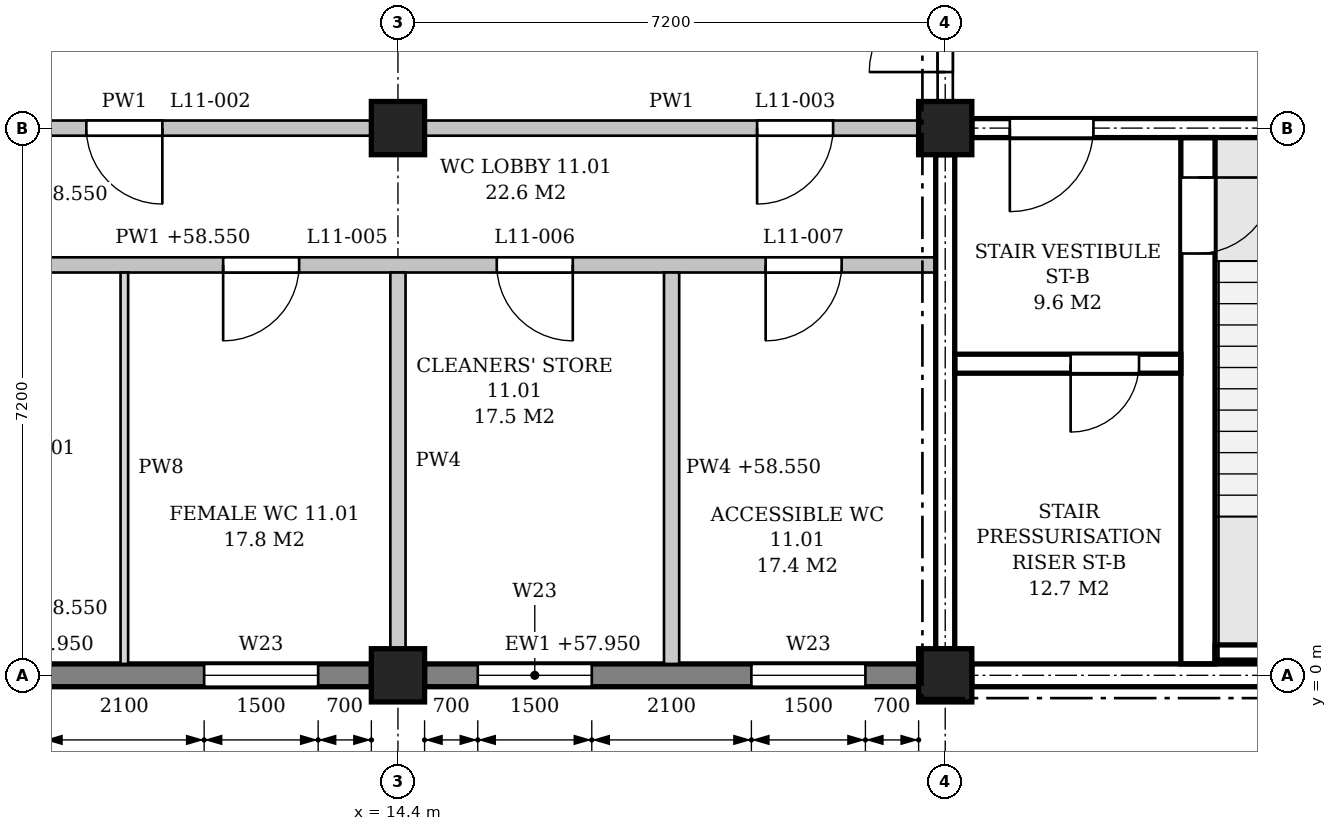
"""IFC4 building model, lengths in metres.
Left out: names, types, materials, properties, quantities, classifications, styles, units other than length and angle.
Written with IfcOpenShell. Run it as: python <this file> out.ifc"""

import sys

from ifc_helpers import new_model, si_unit, direction, frame, frame_2d, origin, origin_2d, place, context, subcontext, project, spatial, polyline, rectangle, outline, extrude, element, fill, save


model = new_model("IFC4")
c1 = context("Model", 3, precision=1e-05, world=origin(), true_north=direction((0.0, 1.0)))
c2 = subcontext(c1, "Body", "Model", "MODEL_VIEW")
j1 = project(units=[si_unit("LENGTHUNIT", "METRE"), si_unit("PLANEANGLEUNIT", "RADIAN")], contexts=[c1])
p1 = place(None, origin())
s1 = spatial("IfcSite", under=j1, at=p1, CompositionType="ELEMENT")
p2 = place(p1, origin())
s2 = spatial("IfcBuilding", under=s1, at=p2, CompositionType="ELEMENT")
p3 = place(p2, frame((0.0, 0.0, 54.3)))
s3 = spatial("IfcBuildingStorey", under=s2, at=p3, CompositionType="ELEMENT", Elevation=54.3)
for number, where, z_axis, x_axis in (
    (1, (14.4, 0.0, 0.0), (0.0, 0.0, 1.0), (1.0, 0.0, 0.0)),
    (2, (14.4, 7.2, 0.0), (0.0, 0.0, 1.0), (1.0, 0.0, 0.0)),
    (3, (21.6, 0.0, 0.0), (0.0, 0.0, 1.0), (1.0, 0.0, 0.0)),
    (4, (21.6, 7.2, 0.0), (0.0, 0.0, 1.0), (1.0, 0.0, 0.0)),
):
    element("IfcColumn", number, at=place(p3, frame(where, z_axis=z_axis, x_axis=x_axis)), inside=s3, PredefinedType="COLUMN", context=c2, shape_type="SweptSolid", body=[
        extrude(rectangle(XDim=0.7, YDim=0.7, at=origin_2d()), origin(), (0.0, 0.0, 1.0), 4.5),
    ])
p4 = place(p3, frame((7.55, 0.0, 0.0), z_axis=(0.0, 0.0, 1.0), x_axis=(1.0, 0.0, 0.0)))
e5 = element("IfcWall", 5, at=p4, inside=s3, PredefinedType="STANDARD", context=c2, shape_type="SweptSolid", body=[
    extrude(rectangle(XDim=6.5, YDim=0.3, at=frame_2d((3.25, 0.0))), origin(), (0.0, 0.0, 1.0), 3.65),
])
p5 = place(p4, frame((0.7, 0.0, 0.9)))
e6 = element("IfcOpeningElement", 6, at=p5, cuts=e5, PredefinedType="OPENING", context=c2, shape_type="SweptSolid", body=[
    extrude(outline(polyline([(0.0, 0.0), (1.5, 0.0), (1.5, 1.95), (0.75, 2.7), (0.0, 1.95), (0.0, 0.0)])), frame((0.0, 0.16, 0.0), z_axis=(0.0, -1.0, 0.0), x_axis=(1.0, 0.0, 0.0)), (0.0, 0.0, 1.0), 0.32),
])
p6 = place(p4, frame((4.3, 0.0, 0.9)))
e7 = element("IfcOpeningElement", 7, at=p6, cuts=e5, PredefinedType="OPENING", context=c2, shape_type="SweptSolid", body=[
    extrude(outline(polyline([(0.0, 0.0), (1.5, 0.0), (1.5, 1.95), (0.75, 2.7), (0.0, 1.95), (0.0, 0.0)])), frame((0.0, 0.16, 0.0), z_axis=(0.0, -1.0, 0.0), x_axis=(1.0, 0.0, 0.0)), (0.0, 0.0, 1.0), 0.32),
])
p7 = place(p3, frame((14.75, 0.0, 0.0), z_axis=(0.0, 0.0, 1.0), x_axis=(1.0, 0.0, 0.0)))
e8 = element("IfcWall", 8, at=p7, inside=s3, PredefinedType="STANDARD", context=c2, shape_type="SweptSolid", body=[
    extrude(rectangle(XDim=6.5, YDim=0.3, at=frame_2d((3.25, 0.0))), origin(), (0.0, 0.0, 1.0), 3.65),
])
p8 = place(p7, frame((0.7, 0.0, 0.9)))
e9 = element("IfcOpeningElement", 9, at=p8, cuts=e8, PredefinedType="OPENING", context=c2, shape_type="SweptSolid", body=[
    extrude(outline(polyline([(0.0, 0.0), (1.5, 0.0), (1.5, 1.95), (0.75, 2.7), (0.0, 1.95), (0.0, 0.0)])), frame((0.0, 0.16, 0.0), z_axis=(0.0, -1.0, 0.0), x_axis=(1.0, 0.0, 0.0)), (0.0, 0.0, 1.0), 0.32),
])
p9 = place(p7, frame((4.3, 0.0, 0.9)))
e10 = element("IfcOpeningElement", 10, at=p9, cuts=e8, PredefinedType="OPENING", context=c2, shape_type="SweptSolid", body=[
    extrude(outline(polyline([(0.0, 0.0), (1.5, 0.0), (1.5, 1.95), (0.75, 2.7), (0.0, 1.95), (0.0, 0.0)])), frame((0.0, 0.16, 0.0), z_axis=(0.0, -1.0, 0.0), x_axis=(1.0, 0.0, 0.0)), (0.0, 0.0, 1.0), 0.32),
])
p10 = place(p3, frame((21.95, 0.0, 0.0), z_axis=(0.0, 0.0, 1.0), x_axis=(1.0, 0.0, 0.0)))
e11 = element("IfcWall", 11, at=p10, inside=s3, PredefinedType="STANDARD", context=c2, shape_type="SweptSolid", body=[
    extrude(rectangle(XDim=6.5, YDim=0.3, at=frame_2d((3.25, 0.0))), origin(), (0.0, 0.0, 1.0), 3.65),
])
p11 = place(p10, frame((4.6, 0.0, 0.9)))
e12 = element("IfcOpeningElement", 12, at=p11, cuts=e11, PredefinedType="OPENING", context=c2, shape_type="SweptSolid", body=[
    extrude(outline(polyline([(0.0, 0.0), (0.9, 0.0), (0.9, 2.25), (0.45, 2.7), (0.0, 2.25), (0.0, 0.0)])), frame((0.0, 0.16, 0.0), z_axis=(0.0, -1.0, 0.0), x_axis=(1.0, 0.0, 0.0)), (0.0, 0.0, 1.0), 0.32),
])
p12 = place(p3, frame((21.95, 7.2, 0.0), z_axis=(0.0, 0.0, 1.0), x_axis=(1.0, 0.0, 0.0)))
e13 = element("IfcWall", 13, at=p12, inside=s3, PredefinedType="SHEAR", context=c2, shape_type="SweptSolid", body=[
    extrude(rectangle(XDim=6.5, YDim=0.25, at=frame_2d((3.25, 0.0))), origin(), (0.0, 0.0, 1.0), 3.55),
])
p13 = place(p12, frame((0.5, 0.0, 0.0)))
e14 = element("IfcOpeningElement", 14, at=p13, cuts=e13, PredefinedType="OPENING", context=c2, shape_type="SweptSolid", body=[
    extrude(rectangle(XDim=1.1, YDim=2.1, at=frame_2d((0.55, 1.05))), frame((0.0, 0.135, 0.0), z_axis=(0.0, -1.0, 0.0), x_axis=(1.0, 0.0, 0.0)), (0.0, 0.0, 1.0), 0.27),
])
p14 = place(p3, frame((21.6, 0.35, 0.0), z_axis=(0.0, 0.0, 1.0), x_axis=(0.0, 1.0, 0.0)))
e15 = element("IfcWall", 15, at=p14, inside=s3, PredefinedType="SHEAR", context=c2, shape_type="SweptSolid", body=[
    extrude(rectangle(XDim=6.5, YDim=0.25, at=frame_2d((3.25, 0.0))), origin(), (0.0, 0.0, 1.0), 3.55),
])
p15 = place(p3, frame((25.15, 0.3, -0.25), z_axis=(0.0, 0.0, 1.0), x_axis=(1.0, 0.0, 0.0)))
e16 = element("IfcWall", 16, at=p15, inside=s3, PredefinedType="SHEAR", context=c2, shape_type="SweptSolid", body=[
    extrude(rectangle(XDim=1.4, YDim=0.2, at=frame_2d((0.7, 0.0))), origin(), (0.0, 0.0, 1.0), 4.5),
])
p16 = place(p3, frame((24.925, 0.15, 0.0), z_axis=(0.0, 0.0, 1.0), x_axis=(0.0, 1.0, 0.0)))
e17 = element("IfcWall", 17, at=p16, inside=s3, PredefinedType="SHEAR", context=c2, shape_type="SweptSolid", body=[
    extrude(rectangle(XDim=6.925, YDim=0.45, at=frame_2d((3.462, 0.0))), origin(), (0.0, 0.0, 1.0), 4.25),
])
p17 = place(p16, frame((5.4, 0.0, 0.0)))
e18 = element("IfcOpeningElement", 18, at=p17, cuts=e17, PredefinedType="OPENING", context=c2, shape_type="SweptSolid", body=[
    extrude(rectangle(XDim=1.0, YDim=2.1, at=frame_2d((0.5, 1.05))), frame((0.0, 0.235, 0.0), z_axis=(0.0, -1.0, 0.0), x_axis=(1.0, 0.0, 0.0)), (0.0, 0.0, 1.0), 0.47),
])
p18 = place(p3, frame((21.725, 4.1, 0.0), z_axis=(0.0, 0.0, 1.0), x_axis=(1.0, 0.0, 0.0)))
e19 = element("IfcWall", 19, at=p18, inside=s3, PredefinedType="SHEAR", context=c2, shape_type="SweptSolid", body=[
    extrude(rectangle(XDim=2.975, YDim=0.25, at=frame_2d((1.487, 0.0))), origin(), (0.0, 0.0, 1.0), 4.25),
])
p19 = place(p18, frame((1.525, 0.0, 0.0)))
e20 = element("IfcOpeningElement", 20, at=p19, cuts=e19, PredefinedType="OPENING", context=c2, shape_type="SweptSolid", body=[
    extrude(rectangle(XDim=0.9, YDim=2.1, at=frame_2d((0.45, 1.05))), frame((0.0, 0.135, 0.0), z_axis=(0.0, -1.0, 0.0), x_axis=(1.0, 0.0, 0.0)), (0.0, 0.0, 1.0), 0.27),
])
p20 = place(p3, frame((7.325, 5.4, 0.0), z_axis=(0.0, 0.0, 1.0), x_axis=(1.0, 0.0, 0.0)))
e21 = element("IfcWall", 21, at=p20, inside=s3, PredefinedType="PARTITIONING", context=c2, shape_type="SweptSolid", body=[
    extrude(outline(polyline([(0.0, 0.0), (14.15, 0.0), (14.15, 3.55), (14.05, 3.55), (14.05, 4.25), (7.3, 4.25), (7.3, 3.55), (6.85, 3.55), (6.85, 4.25), (0.1, 4.25), (0.1, 3.55), (0.0, 3.55), (0.0, 0.0)])), frame((0.0, 0.1, 0.0), z_axis=(0.0, -1.0, 0.0), x_axis=(1.0, 0.0, 0.0)), (0.0, 0.0, 1.0), 0.2),
])
p21 = place(p20, frame((1.238, 0.0, 0.0)))
e22 = element("IfcOpeningElement", 22, at=p21, cuts=e21, PredefinedType="OPENING", context=c2, shape_type="SweptSolid", body=[
    extrude(rectangle(XDim=1.0, YDim=2.1, at=frame_2d((0.5, 1.05))), frame((0.0, 0.11, 0.0), z_axis=(0.0, -1.0, 0.0), x_axis=(1.0, 0.0, 0.0)), (0.0, 0.0, 1.0), 0.22),
])
p22 = place(p20, frame((4.775, 0.0, 0.0)))
e23 = element("IfcOpeningElement", 23, at=p22, cuts=e21, PredefinedType="OPENING", context=c2, shape_type="SweptSolid", body=[
    extrude(rectangle(XDim=1.0, YDim=2.1, at=frame_2d((0.5, 1.05))), frame((0.0, 0.11, 0.0), z_axis=(0.0, -1.0, 0.0), x_axis=(1.0, 0.0, 0.0)), (0.0, 0.0, 1.0), 0.22),
])
p23 = place(p20, frame((8.375, 0.0, 0.0)))
e24 = element("IfcOpeningElement", 24, at=p23, cuts=e21, PredefinedType="OPENING", context=c2, shape_type="SweptSolid", body=[
    extrude(rectangle(XDim=1.0, YDim=2.1, at=frame_2d((0.5, 1.05))), frame((0.0, 0.11, 0.0), z_axis=(0.0, -1.0, 0.0), x_axis=(1.0, 0.0, 0.0)), (0.0, 0.0, 1.0), 0.22),
])
p24 = place(p20, frame((11.913, 0.0, 0.0)))
e25 = element("IfcOpeningElement", 25, at=p24, cuts=e21, PredefinedType="OPENING", context=c2, shape_type="SweptSolid", body=[
    extrude(rectangle(XDim=1.0, YDim=2.1, at=frame_2d((0.5, 1.05))), frame((0.0, 0.11, 0.0), z_axis=(0.0, -1.0, 0.0), x_axis=(1.0, 0.0, 0.0)), (0.0, 0.0, 1.0), 0.22),
])
p25 = place(p3, frame((7.55, 7.2, 0.0), z_axis=(0.0, 0.0, 1.0), x_axis=(1.0, 0.0, 0.0)))
e26 = element("IfcWall", 26, at=p25, inside=s3, PredefinedType="PARTITIONING", context=c2, shape_type="SweptSolid", body=[
    extrude(rectangle(XDim=6.5, YDim=0.2, at=frame_2d((3.25, 0.0))), origin(), (0.0, 0.0, 1.0), 3.55),
])
p26 = place(p25, frame((2.75, 0.0, 0.0)))
e27 = element("IfcOpeningElement", 27, at=p26, cuts=e26, PredefinedType="OPENING", context=c2, shape_type="SweptSolid", body=[
    extrude(rectangle(XDim=1.0, YDim=2.1, at=frame_2d((0.5, 1.05))), frame((0.0, 0.11, 0.0), z_axis=(0.0, -1.0, 0.0), x_axis=(1.0, 0.0, 0.0)), (0.0, 0.0, 1.0), 0.22),
])
p27 = place(p3, frame((14.75, 7.2, 0.0), z_axis=(0.0, 0.0, 1.0), x_axis=(1.0, 0.0, 0.0)))
e28 = element("IfcWall", 28, at=p27, inside=s3, PredefinedType="PARTITIONING", context=c2, shape_type="SweptSolid", body=[
    extrude(rectangle(XDim=6.5, YDim=0.2, at=frame_2d((3.25, 0.0))), origin(), (0.0, 0.0, 1.0), 3.55),
])
p28 = place(p27, frame((4.375, 0.0, 0.0)))
e29 = element("IfcOpeningElement", 29, at=p28, cuts=e28, PredefinedType="OPENING", context=c2, shape_type="SweptSolid", body=[
    extrude(rectangle(XDim=1.0, YDim=2.1, at=frame_2d((0.5, 1.05))), frame((0.0, 0.11, 0.0), z_axis=(0.0, -1.0, 0.0), x_axis=(1.0, 0.0, 0.0)), (0.0, 0.0, 1.0), 0.22),
])
p29 = place(p3, frame((10.8, 0.15, 0.0), z_axis=(0.0, 0.0, 1.0), x_axis=(0.0, 1.0, 0.0)))
e30 = element("IfcWall", 30, at=p29, inside=s3, PredefinedType="PARTITIONING", context=c2, shape_type="SweptSolid", body=[
    extrude(rectangle(XDim=5.15, YDim=0.1, at=frame_2d((2.575, 0.0))), origin(), (0.0, 0.0, 1.0), 3.55),
])
p30 = place(p3, frame((14.4, 0.35, 0.0), z_axis=(0.0, 0.0, 1.0), x_axis=(0.0, 1.0, 0.0)))
e31 = element("IfcWall", 31, at=p30, inside=s3, PredefinedType="PARTITIONING", context=c2, shape_type="SweptSolid", body=[
    extrude(rectangle(XDim=4.95, YDim=0.2, at=frame_2d((2.475, 0.0))), origin(), (0.0, 0.0, 1.0), 3.55),
])
p31 = place(p3, frame((18.0, 0.15, 0.0), z_axis=(0.0, 0.0, 1.0), x_axis=(0.0, 1.0, 0.0)))
e32 = element("IfcWall", 32, at=p31, inside=s3, PredefinedType="PARTITIONING", context=c2, shape_type="SweptSolid", body=[
    extrude(outline(polyline([(0.0, 0.0), (5.15, 0.0), (5.15, 4.25), (0.05, 4.25), (0.05, 3.65), (0.0, 3.65), (0.0, 0.0)])), frame((0.0, 0.1, 0.0), z_axis=(0.0, -1.0, 0.0), x_axis=(1.0, 0.0, 0.0)), (0.0, 0.0, 1.0), 0.2),
])
p32 = place(p3, frame((21.6, 7.55, 0.0), z_axis=(0.0, 0.0, 1.0), x_axis=(0.0, 1.0, 0.0)))
e33 = element("IfcWall", 33, at=p32, inside=s3, PredefinedType="PARTITIONING", context=c2, shape_type="SweptSolid", body=[
    extrude(rectangle(XDim=2.775, YDim=0.2, at=frame_2d((1.387, 0.0))), origin(), (0.0, 0.0, 1.0), 3.55),
])
p33 = place(p32, frame((0.387, 0.0, 0.0)))
e34 = element("IfcOpeningElement", 34, at=p33, cuts=e33, PredefinedType="OPENING", context=c2, shape_type="SweptSolid", body=[
    extrude(rectangle(XDim=2.0, YDim=2.4, at=frame_2d((1.0, 1.2))), frame((0.0, 0.11, 0.0), z_axis=(0.0, -1.0, 0.0), x_axis=(1.0, 0.0, 0.0)), (0.0, 0.0, 1.0), 0.22),
])
p34 = place(p6, origin())
e35 = element("IfcWindow", 35, at=p34, inside=s3, PartitioningType="SINGLE_PANEL", PredefinedType="WINDOW", context=c2, shape_type="SweptSolid", body=[
    extrude(outline(polyline([(0.0, 0.0), (1.5, 0.0), (1.5, 1.95), (0.75, 2.7), (0.0, 1.95), (0.0, 0.0)])), frame((0.0, 0.03, 0.0), z_axis=(0.0, -1.0, 0.0), x_axis=(1.0, 0.0, 0.0)), (0.0, 0.0, 1.0), 0.06),
])
fill(e7, e35)
p35 = place(p8, origin())
e36 = element("IfcWindow", 36, at=p35, inside=s3, PartitioningType="SINGLE_PANEL", PredefinedType="WINDOW", context=c2, shape_type="SweptSolid", body=[
    extrude(outline(polyline([(0.0, 0.0), (1.5, 0.0), (1.5, 1.95), (0.75, 2.7), (0.0, 1.95), (0.0, 0.0)])), frame((0.0, 0.03, 0.0), z_axis=(0.0, -1.0, 0.0), x_axis=(1.0, 0.0, 0.0)), (0.0, 0.0, 1.0), 0.06),
])
fill(e9, e36)
p36 = place(p9, origin())
e37 = element("IfcWindow", 37, at=p36, inside=s3, PartitioningType="SINGLE_PANEL", PredefinedType="WINDOW", context=c2, shape_type="SweptSolid", body=[
    extrude(outline(polyline([(0.0, 0.0), (1.5, 0.0), (1.5, 1.95), (0.75, 2.7), (0.0, 1.95), (0.0, 0.0)])), frame((0.0, 0.03, 0.0), z_axis=(0.0, -1.0, 0.0), x_axis=(1.0, 0.0, 0.0)), (0.0, 0.0, 1.0), 0.06),
])
fill(e10, e37)
p37 = place(p17, frame((1.0, 0.0, 0.0), z_axis=(0.0, 0.0, 1.0), x_axis=(-1.0, 0.0, 0.0)))
e38 = element("IfcDoor", 38, at=p37, inside=s3, OperationType="SINGLE_SWING_LEFT", PredefinedType="DOOR", context=c2, shape_type="SweptSolid", body=[
    extrude(rectangle(XDim=1.0, YDim=2.1, at=frame_2d((0.5, 1.05))), frame((0.0, 0.025, 0.0), z_axis=(0.0, -1.0, 0.0), x_axis=(1.0, 0.0, 0.0)), (0.0, 0.0, 1.0), 0.05),
])
fill(e18, e38)
p38 = place(p13, frame((1.1, 0.0, 0.0), z_axis=(0.0, 0.0, 1.0), x_axis=(-1.0, 0.0, 0.0)))
e39 = element("IfcDoor", 39, at=p38, inside=s3, OperationType="SINGLE_SWING_RIGHT", PredefinedType="DOOR", context=c2, shape_type="SweptSolid", body=[
    extrude(rectangle(XDim=1.1, YDim=2.1, at=frame_2d((0.55, 1.05))), frame((0.0, 0.025, 0.0), z_axis=(0.0, -1.0, 0.0), x_axis=(1.0, 0.0, 0.0)), (0.0, 0.0, 1.0), 0.05),
])
fill(e14, e39)
p39 = place(p19, frame((0.9, 0.0, 0.0), z_axis=(0.0, 0.0, 1.0), x_axis=(-1.0, 0.0, 0.0)))
e40 = element("IfcDoor", 40, at=p39, inside=s3, OperationType="SINGLE_SWING_RIGHT", PredefinedType="DOOR", context=c2, shape_type="SweptSolid", body=[
    extrude(rectangle(XDim=0.9, YDim=2.1, at=frame_2d((0.45, 1.05))), frame((0.0, 0.025, 0.0), z_axis=(0.0, -1.0, 0.0), x_axis=(1.0, 0.0, 0.0)), (0.0, 0.0, 1.0), 0.05),
])
fill(e20, e40)
p40 = place(p33, origin())
e41 = element("IfcDoor", 41, at=p40, inside=s3, OperationType="DOUBLE_DOOR_SINGLE_SWING", PredefinedType="DOOR", context=c2, shape_type="SweptSolid", body=[
    extrude(rectangle(XDim=2.0, YDim=2.4, at=frame_2d((1.0, 1.2))), frame((0.0, 0.025, 0.0), z_axis=(0.0, -1.0, 0.0), x_axis=(1.0, 0.0, 0.0)), (0.0, 0.0, 1.0), 0.05),
])
fill(e34, e41)
p41 = place(p26, frame((1.0, 0.0, 0.0), z_axis=(0.0, 0.0, 1.0), x_axis=(-1.0, 0.0, 0.0)))
e42 = element("IfcDoor", 42, at=p41, inside=s3, OperationType="SINGLE_SWING_LEFT", PredefinedType="DOOR", context=c2, shape_type="SweptSolid", body=[
    extrude(rectangle(XDim=1.0, YDim=2.1, at=frame_2d((0.5, 1.05))), frame((0.0, 0.025, 0.0), z_axis=(0.0, -1.0, 0.0), x_axis=(1.0, 0.0, 0.0)), (0.0, 0.0, 1.0), 0.05),
])
fill(e27, e42)
p42 = place(p28, frame((1.0, 0.0, 0.0), z_axis=(0.0, 0.0, 1.0), x_axis=(-1.0, 0.0, 0.0)))
e43 = element("IfcDoor", 43, at=p42, inside=s3, OperationType="SINGLE_SWING_RIGHT", PredefinedType="DOOR", context=c2, shape_type="SweptSolid", body=[
    extrude(rectangle(XDim=1.0, YDim=2.1, at=frame_2d((0.5, 1.05))), frame((0.0, 0.025, 0.0), z_axis=(0.0, -1.0, 0.0), x_axis=(1.0, 0.0, 0.0)), (0.0, 0.0, 1.0), 0.05),
])
fill(e29, e43)
p43 = place(p22, frame((1.0, 0.0, 0.0), z_axis=(0.0, 0.0, 1.0), x_axis=(-1.0, 0.0, 0.0)))
e44 = element("IfcDoor", 44, at=p43, inside=s3, OperationType="SINGLE_SWING_RIGHT", PredefinedType="DOOR", context=c2, shape_type="SweptSolid", body=[
    extrude(rectangle(XDim=1.0, YDim=2.1, at=frame_2d((0.5, 1.05))), frame((0.0, 0.025, 0.0), z_axis=(0.0, -1.0, 0.0), x_axis=(1.0, 0.0, 0.0)), (0.0, 0.0, 1.0), 0.05),
])
fill(e23, e44)
p44 = place(p23, frame((1.0, 0.0, 0.0), z_axis=(0.0, 0.0, 1.0), x_axis=(-1.0, 0.0, 0.0)))
e45 = element("IfcDoor", 45, at=p44, inside=s3, OperationType="SINGLE_SWING_LEFT", PredefinedType="DOOR", context=c2, shape_type="SweptSolid", body=[
    extrude(rectangle(XDim=1.0, YDim=2.1, at=frame_2d((0.5, 1.05))), frame((0.0, 0.025, 0.0), z_axis=(0.0, -1.0, 0.0), x_axis=(1.0, 0.0, 0.0)), (0.0, 0.0, 1.0), 0.05),
])
fill(e24, e45)
p45 = place(p24, frame((1.0, 0.0, 0.0), z_axis=(0.0, 0.0, 1.0), x_axis=(-1.0, 0.0, 0.0)))
e46 = element("IfcDoor", 46, at=p45, inside=s3, OperationType="SINGLE_SWING_RIGHT", PredefinedType="DOOR", context=c2, shape_type="SweptSolid", body=[
    extrude(rectangle(XDim=1.0, YDim=2.1, at=frame_2d((0.5, 1.05))), frame((0.0, 0.025, 0.0), z_axis=(0.0, -1.0, 0.0), x_axis=(1.0, 0.0, 0.0)), (0.0, 0.0, 1.0), 0.05),
])
fill(e25, e46)
save(model, sys.argv[1])
